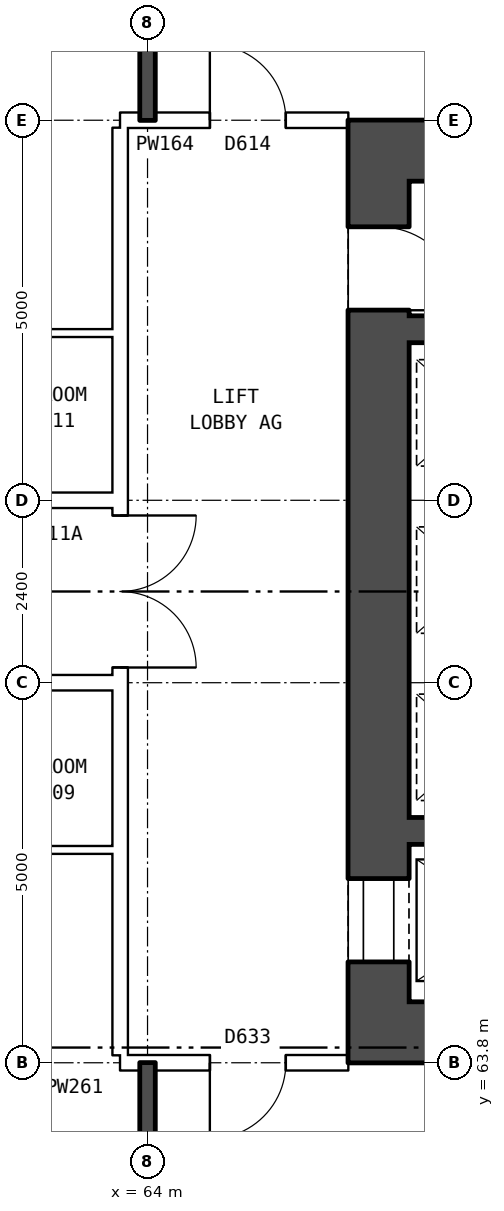
"""IFC4 building model, lengths in metres.
Left out: names, types, materials, properties, quantities, classifications, styles, units other than length and angle.
Written with IfcOpenShell. Run it as: python <this file> out.ifc"""

import sys

from ifc_helpers import new_model, si_unit, direction, frame, frame_2d, origin, place, context, subcontext, project, spatial, rectangle, extrude, element, fill, save


model = new_model("IFC4")
c1 = context("Model", 3, precision=1e-05, world=origin(), true_north=direction((0.0, 1.0)))
c2 = subcontext(c1, "Body", "Model", "MODEL_VIEW")
j1 = project(units=[si_unit("LENGTHUNIT", "METRE"), si_unit("PLANEANGLEUNIT", "RADIAN")], contexts=[c1])
p1 = place(None, origin())
s1 = spatial("IfcSite", under=j1, at=p1, CompositionType="ELEMENT")
p2 = place(p1, origin())
s2 = spatial("IfcBuilding", under=s1, at=p2, CompositionType="ELEMENT")
p3 = place(p2, frame((0.0, 0.0, 44.3)))
s3 = spatial("IfcBuildingStorey", under=s2, at=p3, CompositionType="ELEMENT", Elevation=44.3)
p4 = place(p3, frame((67.04, 64.6, 0.0), z_axis=(0.0, 0.0, 1.0), x_axis=(0.0, 1.0, 0.0)))
e1 = element("IfcWall", 1, at=p4, inside=s3, PredefinedType="SHEAR", context=c2, shape_type="SweptSolid", body=[
    extrude(rectangle(XDim=10.8, YDim=0.8, at=frame_2d((5.4, 0.0))), origin(), (0.0, 0.0, 1.0), 2.85),
])
p5 = place(p4, frame((0.525, 0.0, 0.0)))
e2 = element("IfcOpeningElement", 2, at=p5, cuts=e1, PredefinedType="OPENING", context=c2, shape_type="SweptSolid", body=[
    extrude(rectangle(XDim=1.1, YDim=2.1, at=frame_2d((0.55, 1.05))), frame((0.0, 0.41, 0.0), z_axis=(0.0, -1.0, 0.0), x_axis=(1.0, 0.0, 0.0)), (0.0, 0.0, 1.0), 0.82),
])
p6 = place(p4, frame((9.1, 0.0, 0.0)))
e3 = element("IfcOpeningElement", 3, at=p6, cuts=e1, PredefinedType="OPENING", context=c2, shape_type="SweptSolid", body=[
    extrude(rectangle(XDim=1.1, YDim=2.1, at=frame_2d((0.55, 1.05))), frame((0.0, 0.41, 0.0), z_axis=(0.0, -1.0, 0.0), x_axis=(1.0, 0.0, 0.0)), (0.0, 0.0, 1.0), 0.82),
])
for number, where, z_axis, x_axis in (
    (4, (66.64, 64.2, 0.0), (0.0, 0.0, 1.0), (1.0, 0.0, 0.0)),
    (5, (66.64, 75.8, 0.0), (0.0, 0.0, 1.0), (1.0, 0.0, 0.0)),
):
    element("IfcWall", number, at=place(p3, frame(where, z_axis=z_axis, x_axis=x_axis)), inside=s3, PredefinedType="SHEAR", context=c2, shape_type="SweptSolid", body=[
        extrude(rectangle(XDim=9.0, YDim=0.8, at=frame_2d((4.5, 0.0))), origin(), (0.0, 0.0, 1.0), 2.85),
    ])
p7 = place(p3, frame((67.44, 66.85, 0.0), z_axis=(0.0, 0.0, 1.0), x_axis=(1.0, 0.0, 0.0)))
e6 = element("IfcWall", 6, at=p7, inside=s3, PredefinedType="SHEAR", context=c2, shape_type="SweptSolid", body=[
    extrude(rectangle(XDim=3.245, YDim=0.35, at=frame_2d((1.623, 0.0))), origin(), (0.0, 0.0, 1.0), 2.85),
])
p8 = place(p3, frame((67.44, 73.45, 0.0), z_axis=(0.0, 0.0, 1.0), x_axis=(1.0, 0.0, 0.0)))
e7 = element("IfcWall", 7, at=p8, inside=s3, PredefinedType="SHEAR", context=c2, shape_type="SweptSolid", body=[
    extrude(rectangle(XDim=2.075, YDim=0.35, at=frame_2d((1.038, 0.0))), origin(), (0.0, 0.0, 1.0), 2.85),
])
p9 = place(p3, frame((63.64, 63.9, 0.0), z_axis=(0.0, 0.0, 1.0), x_axis=(0.0, 1.0, 0.0)))
e8 = element("IfcWall", 8, at=p9, inside=s3, PredefinedType="PARTITIONING", context=c2, shape_type="SweptSolid", body=[
    extrude(rectangle(XDim=12.2, YDim=0.2, at=frame_2d((6.1, 0.0))), origin(), (0.0, 0.0, 1.0), 2.85),
])
p10 = place(p9, frame((5.1, 0.0, 0.0)))
e9 = element("IfcOpeningElement", 9, at=p10, cuts=e8, PredefinedType="OPENING", context=c2, shape_type="SweptSolid", body=[
    extrude(rectangle(XDim=2.0, YDim=2.1, at=frame_2d((1.0, 1.05))), frame((0.0, 0.11, 0.0), z_axis=(0.0, -1.0, 0.0), x_axis=(1.0, 0.0, 0.0)), (0.0, 0.0, 1.0), 0.22),
])
p11 = place(p3, frame((63.64, 63.8, 0.0), z_axis=(0.0, 0.0, 1.0), x_axis=(1.0, 0.0, 0.0)))
e10 = element("IfcWall", 10, at=p11, inside=s3, PredefinedType="PARTITIONING", context=c2, shape_type="SweptSolid", body=[
    extrude(rectangle(XDim=3.0, YDim=0.2, at=frame_2d((1.5, 0.0))), origin(), (0.0, 0.0, 1.0), 2.85),
])
p12 = place(p11, frame((1.18, 0.0, 0.0)))
e11 = element("IfcOpeningElement", 11, at=p12, cuts=e10, PredefinedType="OPENING", context=c2, shape_type="SweptSolid", body=[
    extrude(rectangle(XDim=1.0, YDim=2.1, at=frame_2d((0.5, 1.05))), frame((0.0, 0.11, 0.0), z_axis=(0.0, -1.0, 0.0), x_axis=(1.0, 0.0, 0.0)), (0.0, 0.0, 1.0), 0.22),
])
p13 = place(p3, frame((61.0, 66.6, 0.0), z_axis=(0.0, 0.0, 1.0), x_axis=(1.0, 0.0, 0.0)))
e12 = element("IfcWall", 12, at=p13, inside=s3, PredefinedType="PARTITIONING", context=c2, shape_type="SweptSolid", body=[
    extrude(rectangle(XDim=2.64, YDim=0.1, at=frame_2d((1.32, 0.0))), origin(), (0.0, 0.0, 1.0), 2.85),
])
p14 = place(p3, frame((44.36, 68.8, 0.0), z_axis=(0.0, 0.0, 1.0), x_axis=(1.0, 0.0, 0.0)))
e13 = element("IfcWall", 13, at=p14, inside=s3, PredefinedType="PARTITIONING", context=c2, shape_type="SweptSolid", body=[
    extrude(rectangle(XDim=19.28, YDim=0.2, at=frame_2d((9.64, 0.0))), origin(), (0.0, 0.0, 1.0), 2.85),
])
p15 = place(p14, frame((14.64, 0.0, 0.0)))
e14 = element("IfcOpeningElement", 14, at=p15, cuts=e13, PredefinedType="OPENING", context=c2, shape_type="SweptSolid", body=[
    extrude(rectangle(XDim=1.0, YDim=2.1, at=frame_2d((0.5, 1.05))), frame((0.0, 0.11, 0.0), z_axis=(0.0, -1.0, 0.0), x_axis=(1.0, 0.0, 0.0)), (0.0, 0.0, 1.0), 0.22),
])
p16 = place(p14, frame((5.64, 0.0, 0.0)))
e15 = element("IfcOpeningElement", 15, at=p16, cuts=e13, PredefinedType="OPENING", context=c2, shape_type="SweptSolid", body=[
    extrude(rectangle(XDim=1.0, YDim=2.1, at=frame_2d((0.5, 1.05))), frame((0.0, 0.11, 0.0), z_axis=(0.0, -1.0, 0.0), x_axis=(1.0, 0.0, 0.0)), (0.0, 0.0, 1.0), 0.22),
])
p17 = place(p3, frame((44.36, 71.2, 0.0), z_axis=(0.0, 0.0, 1.0), x_axis=(1.0, 0.0, 0.0)))
e16 = element("IfcWall", 16, at=p17, inside=s3, PredefinedType="PARTITIONING", context=c2, shape_type="SweptSolid", body=[
    extrude(rectangle(XDim=19.28, YDim=0.2, at=frame_2d((9.64, 0.0))), origin(), (0.0, 0.0, 1.0), 2.85),
])
p18 = place(p17, frame((14.64, 0.0, 0.0)))
e17 = element("IfcOpeningElement", 17, at=p18, cuts=e16, PredefinedType="OPENING", context=c2, shape_type="SweptSolid", body=[
    extrude(rectangle(XDim=1.0, YDim=2.1, at=frame_2d((0.5, 1.05))), frame((0.0, 0.11, 0.0), z_axis=(0.0, -1.0, 0.0), x_axis=(1.0, 0.0, 0.0)), (0.0, 0.0, 1.0), 0.22),
])
p19 = place(p17, frame((5.64, 0.0, 0.0)))
e18 = element("IfcOpeningElement", 18, at=p19, cuts=e16, PredefinedType="OPENING", context=c2, shape_type="SweptSolid", body=[
    extrude(rectangle(XDim=1.0, YDim=2.1, at=frame_2d((0.5, 1.05))), frame((0.0, 0.11, 0.0), z_axis=(0.0, -1.0, 0.0), x_axis=(1.0, 0.0, 0.0)), (0.0, 0.0, 1.0), 0.22),
])
p20 = place(p3, frame((61.0, 73.4, 0.0), z_axis=(0.0, 0.0, 1.0), x_axis=(1.0, 0.0, 0.0)))
e19 = element("IfcWall", 19, at=p20, inside=s3, PredefinedType="PARTITIONING", context=c2, shape_type="SweptSolid", body=[
    extrude(rectangle(XDim=2.64, YDim=0.1, at=frame_2d((1.32, 0.0))), origin(), (0.0, 0.0, 1.0), 2.85),
])
p21 = place(p3, frame((63.64, 76.2, 0.0), z_axis=(0.0, 0.0, 1.0), x_axis=(1.0, 0.0, 0.0)))
e20 = element("IfcWall", 20, at=p21, inside=s3, PredefinedType="PARTITIONING", context=c2, shape_type="SweptSolid", body=[
    extrude(rectangle(XDim=3.0, YDim=0.2, at=frame_2d((1.5, 0.0))), origin(), (0.0, 0.0, 1.0), 2.85),
])
p22 = place(p21, frame((1.18, 0.0, 0.0)))
e21 = element("IfcOpeningElement", 21, at=p22, cuts=e20, PredefinedType="OPENING", context=c2, shape_type="SweptSolid", body=[
    extrude(rectangle(XDim=1.0, YDim=2.1, at=frame_2d((0.5, 1.05))), frame((0.0, 0.11, 0.0), z_axis=(0.0, -1.0, 0.0), x_axis=(1.0, 0.0, 0.0)), (0.0, 0.0, 1.0), 0.22),
])
for number, where, z_axis, x_axis in (
    (22, (64.0, 54.36, 0.0), (0.0, 0.0, 1.0), (0.0, 1.0, 0.0)),
    (23, (64.0, 76.2, 0.0), (0.0, 0.0, 1.0), (0.0, 1.0, 0.0)),
):
    element("IfcWall", number, at=place(p3, frame(where, z_axis=z_axis, x_axis=x_axis)), inside=s3, PredefinedType="SOLIDWALL", context=c2, shape_type="SweptSolid", body=[
        extrude(rectangle(XDim=9.44, YDim=0.2, at=frame_2d((4.72, 0.0))), origin(), (0.0, 0.0, 1.0), 2.85),
    ])
p23 = place(p5, origin())
e24 = element("IfcDoor", 24, at=p23, inside=s3, OperationType="DOUBLE_DOOR_SLIDING", PredefinedType="DOOR", context=c2, shape_type="SweptSolid", body=[
    extrude(rectangle(XDim=1.1, YDim=2.1, at=frame_2d((0.55, 1.05))), frame((0.0, -0.335, 0.0), z_axis=(0.0, -1.0, 0.0), x_axis=(1.0, 0.0, 0.0)), (0.0, 0.0, 1.0), 0.05),
])
fill(e2, e24)
p24 = place(p6, frame((1.1, 0.0, 0.0), z_axis=(0.0, 0.0, 1.0), x_axis=(-1.0, 0.0, 0.0)))
e25 = element("IfcDoor", 25, at=p24, inside=s3, OperationType="SINGLE_SWING_RIGHT", PredefinedType="DOOR", context=c2, shape_type="SweptSolid", body=[
    extrude(rectangle(XDim=1.1, YDim=2.1, at=frame_2d((0.55, 1.05))), frame((0.0, 0.385, 0.0), z_axis=(0.0, -1.0, 0.0), x_axis=(1.0, 0.0, 0.0)), (0.0, 0.0, 1.0), 0.05),
])
fill(e3, e25)
p25 = place(p10, frame((2.0, 0.0, 0.0), z_axis=(0.0, 0.0, 1.0), x_axis=(-1.0, 0.0, 0.0)))
e26 = element("IfcDoor", 26, at=p25, inside=s3, OperationType="DOUBLE_DOOR_SINGLE_SWING", PredefinedType="DOOR", context=c2, shape_type="SweptSolid", body=[
    extrude(rectangle(XDim=2.0, YDim=2.1, at=frame_2d((1.0, 1.05))), frame((0.0, 0.025, 0.0), z_axis=(0.0, -1.0, 0.0), x_axis=(1.0, 0.0, 0.0)), (0.0, 0.0, 1.0), 0.05),
])
fill(e9, e26)
p26 = place(p12, frame((1.0, 0.0, 0.0), z_axis=(0.0, 0.0, 1.0), x_axis=(-1.0, 0.0, 0.0)))
e27 = element("IfcDoor", 27, at=p26, inside=s3, OperationType="SINGLE_SWING_RIGHT", PredefinedType="DOOR", context=c2, shape_type="SweptSolid", body=[
    extrude(rectangle(XDim=1.0, YDim=2.1, at=frame_2d((0.5, 1.05))), frame((0.0, 0.025, 0.0), z_axis=(0.0, -1.0, 0.0), x_axis=(1.0, 0.0, 0.0)), (0.0, 0.0, 1.0), 0.05),
])
fill(e11, e27)
p27 = place(p22, origin())
e28 = element("IfcDoor", 28, at=p27, inside=s3, OperationType="SINGLE_SWING_LEFT", PredefinedType="DOOR", context=c2, shape_type="SweptSolid", body=[
    extrude(rectangle(XDim=1.0, YDim=2.1, at=frame_2d((0.5, 1.05))), frame((0.0, 0.025, 0.0), z_axis=(0.0, -1.0, 0.0), x_axis=(1.0, 0.0, 0.0)), (0.0, 0.0, 1.0), 0.05),
])
fill(e21, e28)
save(model, sys.argv[1])
